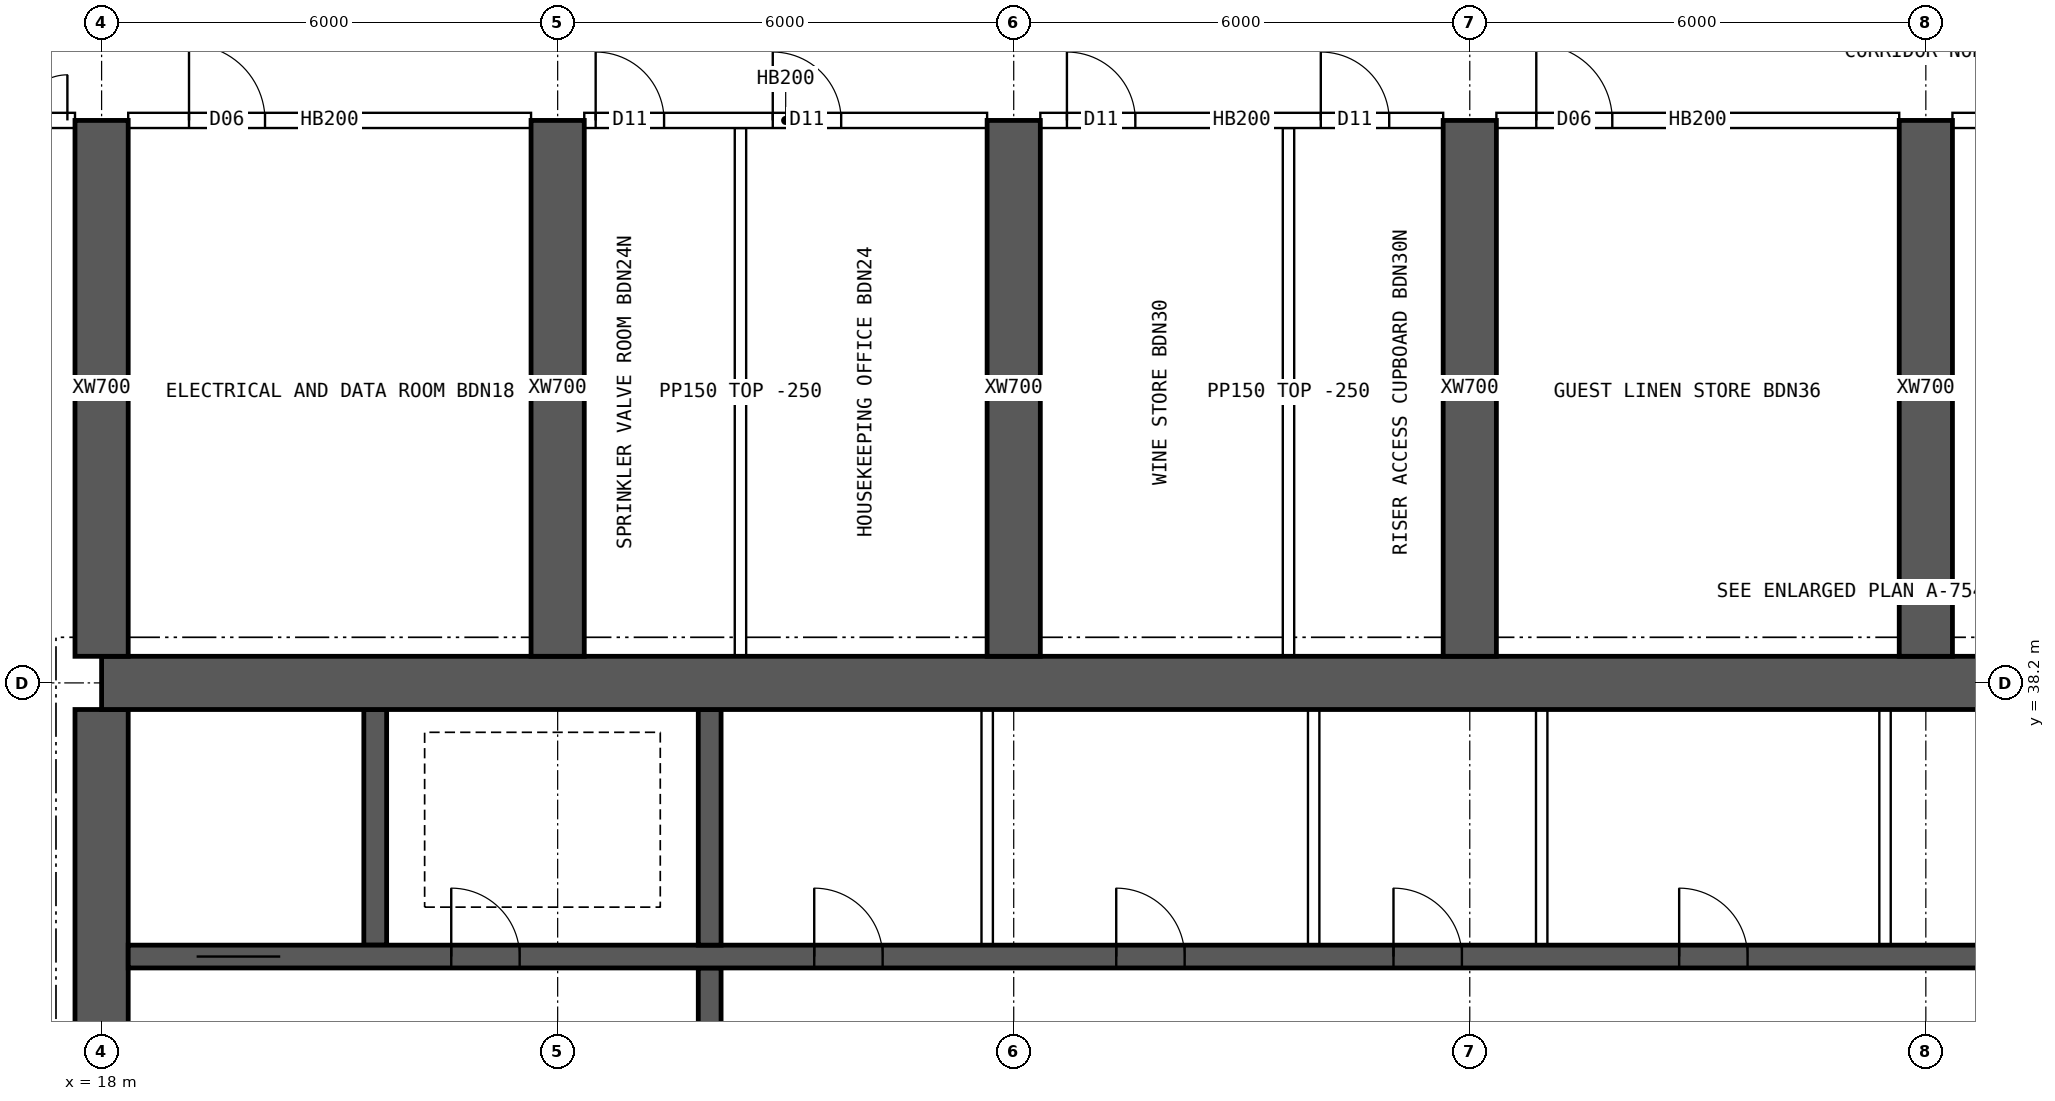
"""IFC4 building model, lengths in metres.
Left out: names, types, materials, properties, quantities, classifications, styles, units other than length and angle.
Written with IfcOpenShell. Run it as: python <this file> out.ifc"""

import sys

from ifc_helpers import new_model, si_unit, direction, frame, frame_2d, origin, place, context, subcontext, project, spatial, rectangle, extrude, element, fill, save


model = new_model("IFC4")
c1 = context("Model", 3, precision=1e-05, world=origin(), true_north=direction((0.0, 1.0)))
c2 = subcontext(c1, "Body", "Model", "MODEL_VIEW")
j1 = project(units=[si_unit("LENGTHUNIT", "METRE"), si_unit("PLANEANGLEUNIT", "RADIAN")], contexts=[c1])
p1 = place(None, origin())
s1 = spatial("IfcSite", under=j1, at=p1, CompositionType="ELEMENT")
p2 = place(p1, origin())
s2 = spatial("IfcBuilding", under=s1, at=p2, CompositionType="ELEMENT")
p3 = place(p2, frame((0.0, 0.0, 208.3)))
s3 = spatial("IfcBuildingStorey", under=s2, at=p3, CompositionType="ELEMENT", Elevation=208.3)
p4 = place(p3, frame((18.0, 38.2, 0.0), z_axis=(0.0, 0.0, 1.0), x_axis=(1.0, 0.0, 0.0)))
e1 = element("IfcWall", 1, at=p4, inside=s3, PredefinedType="SHEAR", context=c2, shape_type="SweptSolid", body=[
    extrude(rectangle(XDim=48.0, YDim=0.7, at=frame_2d((24.0, 0.0))), origin(), (0.0, 0.0, 1.0), 4.5),
])
p5 = place(p3, frame((18.0, 26.15, 0.0), z_axis=(0.0, 0.0, 1.0), x_axis=(0.0, 1.0, 0.0)))
e2 = element("IfcWall", 2, at=p5, inside=s3, PredefinedType="SHEAR", context=c2, shape_type="SweptSolid", body=[
    extrude(rectangle(XDim=11.7, YDim=0.7, at=frame_2d((5.85, 0.0))), origin(), (0.0, 0.0, 1.0), 4.5),
])
p6 = place(p5, frame((5.15, 0.0, 0.0)))
e3 = element("IfcOpeningElement", 3, at=p6, cuts=e2, PredefinedType="OPENING", context=c2, shape_type="SweptSolid", body=[
    extrude(rectangle(XDim=1.2, YDim=2.1, at=frame_2d((0.6, 1.05))), frame((0.0, 0.36, 0.0), z_axis=(0.0, -1.0, 0.0), x_axis=(1.0, 0.0, 0.0)), (0.0, 0.0, 1.0), 0.72),
])
p7 = place(p3, frame((18.35, 34.6, 0.0), z_axis=(0.0, 0.0, 1.0), x_axis=(1.0, 0.0, 0.0)))
e4 = element("IfcWall", 4, at=p7, inside=s3, PredefinedType="SHEAR", context=c2, shape_type="SweptSolid", body=[
    extrude(rectangle(XDim=47.3, YDim=0.3, at=frame_2d((23.65, 0.0))), origin(), (0.0, 0.0, 1.0), 4.5),
])
p8 = place(p7, frame((0.9, 0.0, 0.0)))
e5 = element("IfcOpeningElement", 5, at=p8, cuts=e4, PredefinedType="OPENING", context=c2, shape_type="SweptSolid", body=[
    extrude(rectangle(XDim=1.1, YDim=2.1, at=frame_2d((0.55, 1.05))), frame((0.0, 0.16, 0.0), z_axis=(0.0, -1.0, 0.0), x_axis=(1.0, 0.0, 0.0)), (0.0, 0.0, 1.0), 0.32),
])
p9 = place(p7, frame((45.3, 0.0, 0.0)))
e6 = element("IfcOpeningElement", 6, at=p9, cuts=e4, PredefinedType="OPENING", context=c2, shape_type="SweptSolid", body=[
    extrude(rectangle(XDim=1.1, YDim=2.1, at=frame_2d((0.55, 1.05))), frame((0.0, 0.16, 0.0), z_axis=(0.0, -1.0, 0.0), x_axis=(1.0, 0.0, 0.0)), (0.0, 0.0, 1.0), 0.32),
])
p10 = place(p7, frame((4.25, 0.0, 0.0)))
e7 = element("IfcOpeningElement", 7, at=p10, cuts=e4, PredefinedType="OPENING", context=c2, shape_type="SweptSolid", body=[
    extrude(rectangle(XDim=0.9, YDim=2.1, at=frame_2d((0.45, 1.05))), frame((0.0, 0.16, 0.0), z_axis=(0.0, -1.0, 0.0), x_axis=(1.0, 0.0, 0.0)), (0.0, 0.0, 1.0), 0.32),
])
p11 = place(p7, frame((42.15, 0.0, 0.0)))
e8 = element("IfcOpeningElement", 8, at=p11, cuts=e4, PredefinedType="OPENING", context=c2, shape_type="SweptSolid", body=[
    extrude(rectangle(XDim=0.9, YDim=2.1, at=frame_2d((0.45, 1.05))), frame((0.0, 0.16, 0.0), z_axis=(0.0, -1.0, 0.0), x_axis=(1.0, 0.0, 0.0)), (0.0, 0.0, 1.0), 0.32),
])
p12 = place(p7, frame((9.025, 0.0, 0.0)))
e9 = element("IfcOpeningElement", 9, at=p12, cuts=e4, PredefinedType="OPENING", context=c2, shape_type="SweptSolid", body=[
    extrude(rectangle(XDim=0.9, YDim=2.1, at=frame_2d((0.45, 1.05))), frame((0.0, 0.16, 0.0), z_axis=(0.0, -1.0, 0.0), x_axis=(1.0, 0.0, 0.0)), (0.0, 0.0, 1.0), 0.32),
])
p13 = place(p7, frame((12.999, 0.0, 0.0)))
e10 = element("IfcOpeningElement", 10, at=p13, cuts=e4, PredefinedType="OPENING", context=c2, shape_type="SweptSolid", body=[
    extrude(rectangle(XDim=0.9, YDim=2.1, at=frame_2d((0.45, 1.05))), frame((0.0, 0.16, 0.0), z_axis=(0.0, -1.0, 0.0), x_axis=(1.0, 0.0, 0.0)), (0.0, 0.0, 1.0), 0.32),
])
p14 = place(p7, frame((16.646, 0.0, 0.0)))
e11 = element("IfcOpeningElement", 11, at=p14, cuts=e4, PredefinedType="OPENING", context=c2, shape_type="SweptSolid", body=[
    extrude(rectangle(XDim=0.9, YDim=2.1, at=frame_2d((0.45, 1.05))), frame((0.0, 0.16, 0.0), z_axis=(0.0, -1.0, 0.0), x_axis=(1.0, 0.0, 0.0)), (0.0, 0.0, 1.0), 0.32),
])
p15 = place(p7, frame((20.405, 0.0, 0.0)))
e12 = element("IfcOpeningElement", 12, at=p15, cuts=e4, PredefinedType="OPENING", context=c2, shape_type="SweptSolid", body=[
    extrude(rectangle(XDim=0.9, YDim=2.1, at=frame_2d((0.45, 1.05))), frame((0.0, 0.16, 0.0), z_axis=(0.0, -1.0, 0.0), x_axis=(1.0, 0.0, 0.0)), (0.0, 0.0, 1.0), 0.32),
])
p16 = place(p7, frame((24.811, 0.0, 0.0)))
e13 = element("IfcOpeningElement", 13, at=p16, cuts=e4, PredefinedType="OPENING", context=c2, shape_type="SweptSolid", body=[
    extrude(rectangle(XDim=0.9, YDim=2.1, at=frame_2d((0.45, 1.05))), frame((0.0, 0.16, 0.0), z_axis=(0.0, -1.0, 0.0), x_axis=(1.0, 0.0, 0.0)), (0.0, 0.0, 1.0), 0.32),
])
p17 = place(p7, frame((27.608, 0.0, 0.0)))
e14 = element("IfcOpeningElement", 14, at=p17, cuts=e4, PredefinedType="OPENING", context=c2, shape_type="SweptSolid", body=[
    extrude(rectangle(XDim=0.9, YDim=2.1, at=frame_2d((0.45, 1.05))), frame((0.0, 0.16, 0.0), z_axis=(0.0, -1.0, 0.0), x_axis=(1.0, 0.0, 0.0)), (0.0, 0.0, 1.0), 0.32),
])
p18 = place(p7, frame((29.981, 0.0, 0.0)))
e15 = element("IfcOpeningElement", 15, at=p18, cuts=e4, PredefinedType="OPENING", context=c2, shape_type="SweptSolid", body=[
    extrude(rectangle(XDim=0.9, YDim=2.1, at=frame_2d((0.45, 1.05))), frame((0.0, 0.16, 0.0), z_axis=(0.0, -1.0, 0.0), x_axis=(1.0, 0.0, 0.0)), (0.0, 0.0, 1.0), 0.32),
])
p19 = place(p7, frame((35.451, 0.0, 0.0)))
e16 = element("IfcOpeningElement", 16, at=p19, cuts=e4, PredefinedType="OPENING", context=c2, shape_type="SweptSolid", body=[
    extrude(rectangle(XDim=0.9, YDim=2.1, at=frame_2d((0.45, 1.05))), frame((0.0, 0.16, 0.0), z_axis=(0.0, -1.0, 0.0), x_axis=(1.0, 0.0, 0.0)), (0.0, 0.0, 1.0), 0.32),
])
p20 = place(p3, frame((26.0, 30.55, 0.0), z_axis=(0.0, 0.0, 1.0), x_axis=(0.0, 1.0, 0.0)))
e17 = element("IfcWall", 17, at=p20, inside=s3, PredefinedType="SHEAR", context=c2, shape_type="SweptSolid", body=[
    extrude(rectangle(XDim=3.9, YDim=0.3, at=frame_2d((1.95, 0.0))), origin(), (0.0, 0.0, 1.0), 4.5),
])
p21 = place(p20, frame((1.4, 0.0, 0.0)))
e18 = element("IfcOpeningElement", 18, at=p21, cuts=e17, PredefinedType="OPENING", context=c2, shape_type="SweptSolid", body=[
    extrude(rectangle(XDim=1.2, YDim=2.1, at=frame_2d((0.6, 1.05))), frame((0.0, 0.16, 0.0), z_axis=(0.0, -1.0, 0.0), x_axis=(1.0, 0.0, 0.0)), (0.0, 0.0, 1.0), 0.32),
])
for number, where, z_axis, x_axis in (
    (19, (21.6, 34.75, 0.0), (0.0, 0.0, 1.0), (0.0, 1.0, 0.0)),
    (20, (26.0, 34.75, 0.0), (0.0, 0.0, 1.0), (0.0, 1.0, 0.0)),
):
    element("IfcWall", number, at=place(p3, frame(where, z_axis=z_axis, x_axis=x_axis)), inside=s3, PredefinedType="SHEAR", context=c2, shape_type="SweptSolid", body=[
        extrude(rectangle(XDim=3.1, YDim=0.3, at=frame_2d((1.55, 0.0))), origin(), (0.0, 0.0, 1.0), 4.5),
    ])
for number, where, z_axis, x_axis in (
    (21, (18.0, 38.55, 0.0), (0.0, 0.0, 1.0), (0.0, 1.0, 0.0)),
    (22, (24.0, 38.55, 0.0), (0.0, 0.0, 1.0), (0.0, 1.0, 0.0)),
    (23, (30.0, 38.55, 0.0), (0.0, 0.0, 1.0), (0.0, 1.0, 0.0)),
    (24, (36.0, 38.55, 0.0), (0.0, 0.0, 1.0), (0.0, 1.0, 0.0)),
    (25, (42.0, 38.55, 0.0), (0.0, 0.0, 1.0), (0.0, 1.0, 0.0)),
):
    element("IfcWall", number, at=place(p3, frame(where, z_axis=z_axis, x_axis=x_axis)), inside=s3, PredefinedType="SHEAR", context=c2, shape_type="SweptSolid", body=[
        extrude(rectangle(XDim=7.05, YDim=0.7, at=frame_2d((3.525, 0.0))), origin(), (0.0, 0.0, 1.0), 4.5),
    ])
for number, where, z_axis, x_axis in (
    (26, (29.651, 34.75, 0.0), (0.0, 0.0, 1.0), (0.0, 1.0, 0.0)),
    (27, (33.946, 34.75, 0.0), (0.0, 0.0, 1.0), (0.0, 1.0, 0.0)),
    (28, (36.946, 34.75, 0.0), (0.0, 0.0, 1.0), (0.0, 1.0, 0.0)),
    (29, (41.463, 34.75, 0.0), (0.0, 0.0, 1.0), (0.0, 1.0, 0.0)),
):
    element("IfcWall", number, at=place(p3, frame(where, z_axis=z_axis, x_axis=x_axis)), inside=s3, PredefinedType="SOLIDWALL", context=c2, shape_type="SweptSolid", body=[
        extrude(rectangle(XDim=3.1, YDim=0.15, at=frame_2d((1.55, 0.0))), origin(), (0.0, 0.0, 1.0), 4.25),
    ])
p22 = place(p3, frame((15.6, 45.6, 0.0), z_axis=(0.0, 0.0, 1.0), x_axis=(1.0, 0.0, 0.0)))
e30 = element("IfcWall", 30, at=p22, inside=s3, PredefinedType="SOLIDWALL", context=c2, shape_type="SweptSolid", body=[
    extrude(rectangle(XDim=2.05, YDim=0.2, at=frame_2d((1.025, 0.0))), origin(), (0.0, 0.0, 1.0), 4.25),
])
p23 = place(p22, frame((0.75, 0.0, 0.0)))
e31 = element("IfcOpeningElement", 31, at=p23, cuts=e30, PredefinedType="OPENING", context=c2, shape_type="SweptSolid", body=[
    extrude(rectangle(XDim=1.2, YDim=2.1, at=frame_2d((0.6, 1.05))), frame((0.0, 0.11, 0.0), z_axis=(0.0, -1.0, 0.0), x_axis=(1.0, 0.0, 0.0)), (0.0, 0.0, 1.0), 0.22),
])
p24 = place(p3, frame((18.35, 45.6, 0.0), z_axis=(0.0, 0.0, 1.0), x_axis=(1.0, 0.0, 0.0)))
e32 = element("IfcWall", 32, at=p24, inside=s3, PredefinedType="SOLIDWALL", context=c2, shape_type="SweptSolid", body=[
    extrude(rectangle(XDim=5.3, YDim=0.2, at=frame_2d((2.65, 0.0))), origin(), (0.0, 0.0, 1.0), 4.25),
])
p25 = place(p24, frame((0.8, 0.0, 0.0)))
e33 = element("IfcOpeningElement", 33, at=p25, cuts=e32, PredefinedType="OPENING", context=c2, shape_type="SweptSolid", body=[
    extrude(rectangle(XDim=1.0, YDim=2.1, at=frame_2d((0.5, 1.05))), frame((0.0, 0.11, 0.0), z_axis=(0.0, -1.0, 0.0), x_axis=(1.0, 0.0, 0.0)), (0.0, 0.0, 1.0), 0.22),
])
p26 = place(p3, frame((24.35, 45.6, 0.0), z_axis=(0.0, 0.0, 1.0), x_axis=(1.0, 0.0, 0.0)))
e34 = element("IfcWall", 34, at=p26, inside=s3, PredefinedType="SOLIDWALL", context=c2, shape_type="SweptSolid", body=[
    extrude(rectangle(XDim=5.3, YDim=0.2, at=frame_2d((2.65, 0.0))), origin(), (0.0, 0.0, 1.0), 4.25),
])
p27 = place(p26, frame((0.15, 0.0, 0.0)))
e35 = element("IfcOpeningElement", 35, at=p27, cuts=e34, PredefinedType="OPENING", context=c2, shape_type="SweptSolid", body=[
    extrude(rectangle(XDim=0.9, YDim=2.1, at=frame_2d((0.45, 1.05))), frame((0.0, 0.11, 0.0), z_axis=(0.0, -1.0, 0.0), x_axis=(1.0, 0.0, 0.0)), (0.0, 0.0, 1.0), 0.22),
])
p28 = place(p26, frame((2.48, 0.0, 0.0)))
e36 = element("IfcOpeningElement", 36, at=p28, cuts=e34, PredefinedType="OPENING", context=c2, shape_type="SweptSolid", body=[
    extrude(rectangle(XDim=0.9, YDim=2.1, at=frame_2d((0.45, 1.05))), frame((0.0, 0.11, 0.0), z_axis=(0.0, -1.0, 0.0), x_axis=(1.0, 0.0, 0.0)), (0.0, 0.0, 1.0), 0.22),
])
p29 = place(p3, frame((30.35, 45.6, 0.0), z_axis=(0.0, 0.0, 1.0), x_axis=(1.0, 0.0, 0.0)))
e37 = element("IfcWall", 37, at=p29, inside=s3, PredefinedType="SOLIDWALL", context=c2, shape_type="SweptSolid", body=[
    extrude(rectangle(XDim=5.3, YDim=0.2, at=frame_2d((2.65, 0.0))), origin(), (0.0, 0.0, 1.0), 4.25),
])
p30 = place(p29, frame((0.35, 0.0, 0.0)))
e38 = element("IfcOpeningElement", 38, at=p30, cuts=e37, PredefinedType="OPENING", context=c2, shape_type="SweptSolid", body=[
    extrude(rectangle(XDim=0.9, YDim=2.1, at=frame_2d((0.45, 1.05))), frame((0.0, 0.11, 0.0), z_axis=(0.0, -1.0, 0.0), x_axis=(1.0, 0.0, 0.0)), (0.0, 0.0, 1.0), 0.22),
])
p31 = place(p29, frame((3.69, 0.0, 0.0)))
e39 = element("IfcOpeningElement", 39, at=p31, cuts=e37, PredefinedType="OPENING", context=c2, shape_type="SweptSolid", body=[
    extrude(rectangle(XDim=0.9, YDim=2.1, at=frame_2d((0.45, 1.05))), frame((0.0, 0.11, 0.0), z_axis=(0.0, -1.0, 0.0), x_axis=(1.0, 0.0, 0.0)), (0.0, 0.0, 1.0), 0.22),
])
p32 = place(p3, frame((36.35, 45.6, 0.0), z_axis=(0.0, 0.0, 1.0), x_axis=(1.0, 0.0, 0.0)))
e40 = element("IfcWall", 40, at=p32, inside=s3, PredefinedType="SOLIDWALL", context=c2, shape_type="SweptSolid", body=[
    extrude(rectangle(XDim=5.3, YDim=0.2, at=frame_2d((2.65, 0.0))), origin(), (0.0, 0.0, 1.0), 4.25),
])
p33 = place(p32, frame((0.525, 0.0, 0.0)))
e41 = element("IfcOpeningElement", 41, at=p33, cuts=e40, PredefinedType="OPENING", context=c2, shape_type="SweptSolid", body=[
    extrude(rectangle(XDim=1.0, YDim=2.1, at=frame_2d((0.5, 1.05))), frame((0.0, 0.11, 0.0), z_axis=(0.0, -1.0, 0.0), x_axis=(1.0, 0.0, 0.0)), (0.0, 0.0, 1.0), 0.22),
])
p34 = place(p3, frame((42.35, 45.6, 0.0), z_axis=(0.0, 0.0, 1.0), x_axis=(1.0, 0.0, 0.0)))
e42 = element("IfcWall", 42, at=p34, inside=s3, PredefinedType="SOLIDWALL", context=c2, shape_type="SweptSolid", body=[
    extrude(rectangle(XDim=5.3, YDim=0.2, at=frame_2d((2.65, 0.0))), origin(), (0.0, 0.0, 1.0), 4.25),
])
p35 = place(p34, frame((0.35, 0.0, 0.0)))
e43 = element("IfcOpeningElement", 43, at=p35, cuts=e42, PredefinedType="OPENING", context=c2, shape_type="SweptSolid", body=[
    extrude(rectangle(XDim=0.9, YDim=2.1, at=frame_2d((0.45, 1.05))), frame((0.0, 0.11, 0.0), z_axis=(0.0, -1.0, 0.0), x_axis=(1.0, 0.0, 0.0)), (0.0, 0.0, 1.0), 0.22),
])
p36 = place(p34, frame((2.785, 0.0, 0.0)))
e44 = element("IfcOpeningElement", 44, at=p36, cuts=e42, PredefinedType="OPENING", context=c2, shape_type="SweptSolid", body=[
    extrude(rectangle(XDim=0.9, YDim=2.1, at=frame_2d((0.45, 1.05))), frame((0.0, 0.11, 0.0), z_axis=(0.0, -1.0, 0.0), x_axis=(1.0, 0.0, 0.0)), (0.0, 0.0, 1.0), 0.22),
])
for number, where, z_axis, x_axis in (
    (45, (26.405, 38.55, 0.0), (0.0, 0.0, 1.0), (0.0, 1.0, 0.0)),
    (46, (33.615, 38.55, 0.0), (0.0, 0.0, 1.0), (0.0, 1.0, 0.0)),
):
    element("IfcWall", number, at=place(p3, frame(where, z_axis=z_axis, x_axis=x_axis)), inside=s3, PredefinedType="PARTITIONING", context=c2, shape_type="SweptSolid", body=[
        extrude(rectangle(XDim=6.95, YDim=0.15, at=frame_2d((3.475, 0.0))), origin(), (0.0, 0.0, 1.0), 4.25),
    ])
p37 = place(p8, origin())
e47 = element("IfcDoor", 47, at=p37, inside=s3, OperationType="DOUBLE_DOOR_SLIDING", PredefinedType="DOOR", context=c2, shape_type="SweptSolid", body=[
    extrude(rectangle(XDim=1.1, YDim=2.1, at=frame_2d((0.55, 1.05))), frame((0.0, 0.025, 0.0), z_axis=(0.0, -1.0, 0.0), x_axis=(1.0, 0.0, 0.0)), (0.0, 0.0, 1.0), 0.05),
])
fill(e5, e47)
p38 = place(p10, origin())
e48 = element("IfcDoor", 48, at=p38, inside=s3, OperationType="SINGLE_SWING_LEFT", PredefinedType="DOOR", context=c2, shape_type="SweptSolid", body=[
    extrude(rectangle(XDim=0.9, YDim=2.1, at=frame_2d((0.45, 1.05))), frame((0.0, 0.025, 0.0), z_axis=(0.0, -1.0, 0.0), x_axis=(1.0, 0.0, 0.0)), (0.0, 0.0, 1.0), 0.05),
])
fill(e7, e48)
p39 = place(p12, origin())
e49 = element("IfcDoor", 49, at=p39, inside=s3, OperationType="SINGLE_SWING_LEFT", PredefinedType="DOOR", context=c2, shape_type="SweptSolid", body=[
    extrude(rectangle(XDim=0.9, YDim=2.1, at=frame_2d((0.45, 1.05))), frame((0.0, 0.025, 0.0), z_axis=(0.0, -1.0, 0.0), x_axis=(1.0, 0.0, 0.0)), (0.0, 0.0, 1.0), 0.05),
])
fill(e9, e49)
p40 = place(p13, origin())
e50 = element("IfcDoor", 50, at=p40, inside=s3, OperationType="SINGLE_SWING_LEFT", PredefinedType="DOOR", context=c2, shape_type="SweptSolid", body=[
    extrude(rectangle(XDim=0.9, YDim=2.1, at=frame_2d((0.45, 1.05))), frame((0.0, 0.025, 0.0), z_axis=(0.0, -1.0, 0.0), x_axis=(1.0, 0.0, 0.0)), (0.0, 0.0, 1.0), 0.05),
])
fill(e10, e50)
p41 = place(p14, origin())
e51 = element("IfcDoor", 51, at=p41, inside=s3, OperationType="SINGLE_SWING_LEFT", PredefinedType="DOOR", context=c2, shape_type="SweptSolid", body=[
    extrude(rectangle(XDim=0.9, YDim=2.1, at=frame_2d((0.45, 1.05))), frame((0.0, 0.025, 0.0), z_axis=(0.0, -1.0, 0.0), x_axis=(1.0, 0.0, 0.0)), (0.0, 0.0, 1.0), 0.05),
])
fill(e11, e51)
p42 = place(p15, origin())
e52 = element("IfcDoor", 52, at=p42, inside=s3, OperationType="SINGLE_SWING_LEFT", PredefinedType="DOOR", context=c2, shape_type="SweptSolid", body=[
    extrude(rectangle(XDim=0.9, YDim=2.1, at=frame_2d((0.45, 1.05))), frame((0.0, 0.025, 0.0), z_axis=(0.0, -1.0, 0.0), x_axis=(1.0, 0.0, 0.0)), (0.0, 0.0, 1.0), 0.05),
])
fill(e12, e52)
p43 = place(p23, origin())
e53 = element("IfcDoor", 53, at=p43, inside=s3, OperationType="DOUBLE_DOOR_SINGLE_SWING", PredefinedType="DOOR", context=c2, shape_type="SweptSolid", body=[
    extrude(rectangle(XDim=1.2, YDim=2.1, at=frame_2d((0.6, 1.05))), frame((0.0, 0.025, 0.0), z_axis=(0.0, -1.0, 0.0), x_axis=(1.0, 0.0, 0.0)), (0.0, 0.0, 1.0), 0.05),
])
fill(e31, e53)
p44 = place(p25, origin())
e54 = element("IfcDoor", 54, at=p44, inside=s3, OperationType="SINGLE_SWING_LEFT", PredefinedType="DOOR", context=c2, shape_type="SweptSolid", body=[
    extrude(rectangle(XDim=1.0, YDim=2.1, at=frame_2d((0.5, 1.05))), frame((0.0, 0.025, 0.0), z_axis=(0.0, -1.0, 0.0), x_axis=(1.0, 0.0, 0.0)), (0.0, 0.0, 1.0), 0.05),
])
fill(e33, e54)
p45 = place(p27, origin())
e55 = element("IfcDoor", 55, at=p45, inside=s3, OperationType="SINGLE_SWING_LEFT", PredefinedType="DOOR", context=c2, shape_type="SweptSolid", body=[
    extrude(rectangle(XDim=0.9, YDim=2.1, at=frame_2d((0.45, 1.05))), frame((0.0, 0.025, 0.0), z_axis=(0.0, -1.0, 0.0), x_axis=(1.0, 0.0, 0.0)), (0.0, 0.0, 1.0), 0.05),
])
fill(e35, e55)
p46 = place(p28, origin())
e56 = element("IfcDoor", 56, at=p46, inside=s3, OperationType="SINGLE_SWING_LEFT", PredefinedType="DOOR", context=c2, shape_type="SweptSolid", body=[
    extrude(rectangle(XDim=0.9, YDim=2.1, at=frame_2d((0.45, 1.05))), frame((0.0, 0.025, 0.0), z_axis=(0.0, -1.0, 0.0), x_axis=(1.0, 0.0, 0.0)), (0.0, 0.0, 1.0), 0.05),
])
fill(e36, e56)
p47 = place(p30, origin())
e57 = element("IfcDoor", 57, at=p47, inside=s3, OperationType="SINGLE_SWING_LEFT", PredefinedType="DOOR", context=c2, shape_type="SweptSolid", body=[
    extrude(rectangle(XDim=0.9, YDim=2.1, at=frame_2d((0.45, 1.05))), frame((0.0, 0.025, 0.0), z_axis=(0.0, -1.0, 0.0), x_axis=(1.0, 0.0, 0.0)), (0.0, 0.0, 1.0), 0.05),
])
fill(e38, e57)
p48 = place(p31, origin())
e58 = element("IfcDoor", 58, at=p48, inside=s3, OperationType="SINGLE_SWING_LEFT", PredefinedType="DOOR", context=c2, shape_type="SweptSolid", body=[
    extrude(rectangle(XDim=0.9, YDim=2.1, at=frame_2d((0.45, 1.05))), frame((0.0, 0.025, 0.0), z_axis=(0.0, -1.0, 0.0), x_axis=(1.0, 0.0, 0.0)), (0.0, 0.0, 1.0), 0.05),
])
fill(e39, e58)
p49 = place(p33, origin())
e59 = element("IfcDoor", 59, at=p49, inside=s3, OperationType="SINGLE_SWING_LEFT", PredefinedType="DOOR", context=c2, shape_type="SweptSolid", body=[
    extrude(rectangle(XDim=1.0, YDim=2.1, at=frame_2d((0.5, 1.05))), frame((0.0, 0.025, 0.0), z_axis=(0.0, -1.0, 0.0), x_axis=(1.0, 0.0, 0.0)), (0.0, 0.0, 1.0), 0.05),
])
fill(e41, e59)
save(model, sys.argv[1])
